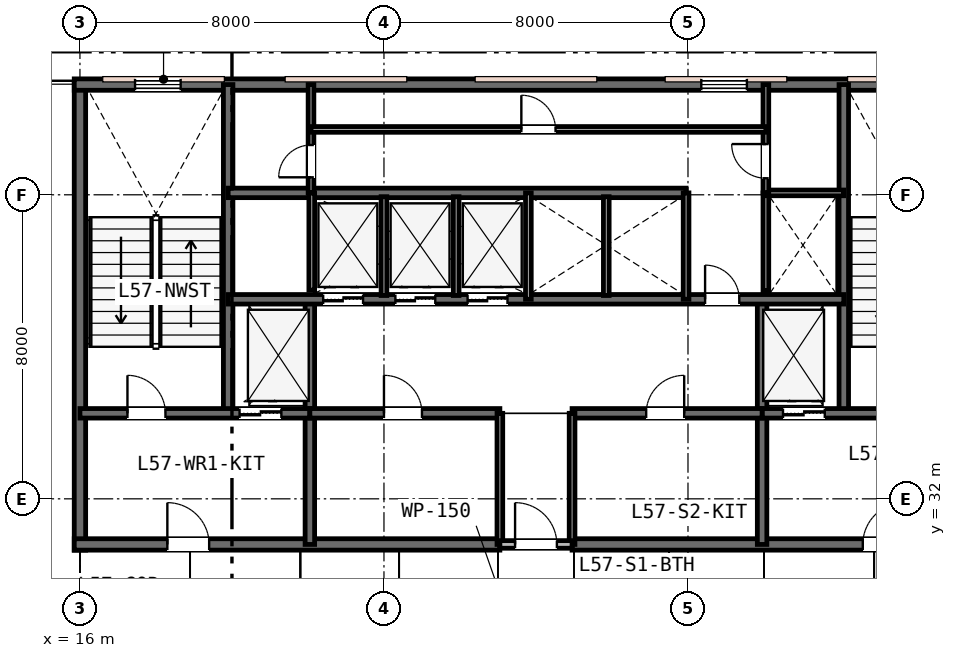
"""IFC4 building model, lengths in metres.
Left out: names, types, materials, properties, quantities, classifications, styles, units other than length and angle.
Written with IfcOpenShell. Run it as: python <this file> out.ifc"""

import sys

from ifc_helpers import new_model, si_unit, direction, frame, frame_2d, origin, place, context, subcontext, project, spatial, rectangle, extrude, element, fill, save


model = new_model("IFC4")
c1 = context("Model", 3, precision=1e-05, world=origin(), true_north=direction((0.0, 1.0)))
c2 = subcontext(c1, "Body", "Model", "MODEL_VIEW")
j1 = project(units=[si_unit("LENGTHUNIT", "METRE"), si_unit("PLANEANGLEUNIT", "RADIAN")], contexts=[c1])
p1 = place(None, origin())
s1 = spatial("IfcSite", under=j1, at=p1, CompositionType="ELEMENT")
p2 = place(p1, origin())
s2 = spatial("IfcBuilding", under=s1, at=p2, CompositionType="ELEMENT")
p3 = place(p2, frame((0.0, 0.0, 222.2)))
s3 = spatial("IfcBuildingStorey", under=s2, at=p3, CompositionType="ELEMENT", Elevation=222.2)
p4 = place(p3, frame((16.0, 30.65, 0.0), z_axis=(0.0, 0.0, 1.0), x_axis=(0.0, 1.0, 0.0)))
e1 = element("IfcWall", 1, at=p4, inside=s3, PredefinedType="SHEAR", context=c2, shape_type="SweptSolid", body=[
    extrude(rectangle(XDim=12.3, YDim=0.3, at=frame_2d((6.15, 0.0))), origin(), (0.0, 0.0, 1.0), 3.8),
])
p5 = place(p3, frame((15.85, 42.9, 0.0), z_axis=(0.0, 0.0, 1.0), x_axis=(1.0, 0.0, 0.0)))
e2 = element("IfcWall", 2, at=p5, inside=s3, PredefinedType="SHEAR", context=c2, shape_type="SweptSolid", body=[
    extrude(rectangle(XDim=24.3, YDim=0.3, at=frame_2d((12.15, 0.0))), origin(), (0.0, 0.0, 1.0), 3.8),
])
p6 = place(p5, frame((1.6, 0.0, 0.95)))
e3 = element("IfcOpeningElement", 3, at=p6, cuts=e2, PredefinedType="OPENING", context=c2, shape_type="SweptSolid", body=[
    extrude(rectangle(XDim=1.2, YDim=1.6, at=frame_2d((0.6, 0.8))), frame((0.0, 0.16, 0.0), z_axis=(0.0, -1.0, 0.0), x_axis=(1.0, 0.0, 0.0)), (0.0, 0.0, 1.0), 0.32),
])
p7 = place(p5, frame((16.5, 0.0, 0.95)))
e4 = element("IfcOpeningElement", 4, at=p7, cuts=e2, PredefinedType="OPENING", context=c2, shape_type="SweptSolid", body=[
    extrude(rectangle(XDim=1.2, YDim=1.6, at=frame_2d((0.6, 0.8))), frame((0.0, 0.16, 0.0), z_axis=(0.0, -1.0, 0.0), x_axis=(1.0, 0.0, 0.0)), (0.0, 0.0, 1.0), 0.32),
])
p8 = place(p5, frame((21.6, 0.0, 0.95)))
e5 = element("IfcOpeningElement", 5, at=p8, cuts=e2, PredefinedType="OPENING", context=c2, shape_type="SweptSolid", body=[
    extrude(rectangle(XDim=1.2, YDim=1.6, at=frame_2d((0.6, 0.8))), frame((0.0, 0.16, 0.0), z_axis=(0.0, -1.0, 0.0), x_axis=(1.0, 0.0, 0.0)), (0.0, 0.0, 1.0), 0.32),
])
p9 = place(p3, frame((15.85, 30.8, 0.0), z_axis=(0.0, 0.0, 1.0), x_axis=(1.0, 0.0, 0.0)))
e6 = element("IfcWall", 6, at=p9, inside=s3, PredefinedType="SHEAR", context=c2, shape_type="SweptSolid", body=[
    extrude(rectangle(XDim=11.2, YDim=0.3, at=frame_2d((5.6, 0.0))), origin(), (0.0, 0.0, 1.0), 3.8),
])
p10 = place(p9, frame((2.45, 0.0, 0.0)))
e7 = element("IfcOpeningElement", 7, at=p10, cuts=e6, PredefinedType="OPENING", context=c2, shape_type="SweptSolid", body=[
    extrude(rectangle(XDim=1.1, YDim=2.15, at=frame_2d((0.55, 1.075))), frame((0.0, 0.16, 0.0), z_axis=(0.0, -1.0, 0.0), x_axis=(1.0, 0.0, 0.0)), (0.0, 0.0, 1.0), 0.32),
])
p11 = place(p3, frame((28.95, 30.8, 0.0), z_axis=(0.0, 0.0, 1.0), x_axis=(1.0, 0.0, 0.0)))
e8 = element("IfcWall", 8, at=p11, inside=s3, PredefinedType="SHEAR", context=c2, shape_type="SweptSolid", body=[
    extrude(rectangle(XDim=11.2, YDim=0.3, at=frame_2d((5.6, 0.0))), origin(), (0.0, 0.0, 1.0), 3.8),
])
p12 = place(p11, frame((7.65, 0.0, 0.0)))
e9 = element("IfcOpeningElement", 9, at=p12, cuts=e8, PredefinedType="OPENING", context=c2, shape_type="SweptSolid", body=[
    extrude(rectangle(XDim=1.1, YDim=2.15, at=frame_2d((0.55, 1.075))), frame((0.0, 0.16, 0.0), z_axis=(0.0, -1.0, 0.0), x_axis=(1.0, 0.0, 0.0)), (0.0, 0.0, 1.0), 0.32),
])
for number, where, z_axis, x_axis in (
    (10, (19.9, 34.25, 0.0), (0.0, 0.0, 1.0), (0.0, 1.0, 0.0)),
    (11, (36.1, 34.25, 0.0), (0.0, 0.0, 1.0), (0.0, 1.0, 0.0)),
):
    element("IfcWall", number, at=place(p3, frame(where, z_axis=z_axis, x_axis=x_axis)), inside=s3, PredefinedType="SHEAR", context=c2, shape_type="SweptSolid", body=[
        extrude(rectangle(XDim=8.65, YDim=0.25, at=frame_2d((4.325, 0.0))), origin(), (0.0, 0.0, 1.0), 3.8),
    ])
for number, where, z_axis, x_axis in (
    (12, (22.05, 30.8, 0.0), (0.0, 0.0, 1.0), (0.0, 1.0, 0.0)),
    (13, (33.95, 30.8, 0.0), (0.0, 0.0, 1.0), (0.0, 1.0, 0.0)),
):
    element("IfcWall", number, at=place(p3, frame(where, z_axis=z_axis, x_axis=x_axis)), inside=s3, PredefinedType="SHEAR", context=c2, shape_type="SweptSolid", body=[
        extrude(rectangle(XDim=6.45, YDim=0.25, at=frame_2d((3.225, 0.0))), origin(), (0.0, 0.0, 1.0), 3.8),
    ])
p13 = place(p3, frame((16.0, 34.25, 0.0), z_axis=(0.0, 0.0, 1.0), x_axis=(1.0, 0.0, 0.0)))
e14 = element("IfcWall", 14, at=p13, inside=s3, PredefinedType="SHEAR", context=c2, shape_type="SweptSolid", body=[
    extrude(rectangle(XDim=6.05, YDim=0.25, at=frame_2d((3.025, 0.0))), origin(), (0.0, 0.0, 1.0), 3.8),
])
p14 = place(p13, frame((1.25, 0.0, 0.0)))
e15 = element("IfcOpeningElement", 15, at=p14, cuts=e14, PredefinedType="OPENING", context=c2, shape_type="SweptSolid", body=[
    extrude(rectangle(XDim=1.0, YDim=2.15, at=frame_2d((0.5, 1.075))), frame((0.0, 0.135, 0.0), z_axis=(0.0, -1.0, 0.0), x_axis=(1.0, 0.0, 0.0)), (0.0, 0.0, 1.0), 0.27),
])
p15 = place(p13, frame((4.2, 0.0, 0.0)))
e16 = element("IfcOpeningElement", 16, at=p15, cuts=e14, PredefinedType="OPENING", context=c2, shape_type="SweptSolid", body=[
    extrude(rectangle(XDim=1.1, YDim=2.15, at=frame_2d((0.55, 1.075))), frame((0.0, 0.135, 0.0), z_axis=(0.0, -1.0, 0.0), x_axis=(1.0, 0.0, 0.0)), (0.0, 0.0, 1.0), 0.27),
])
p16 = place(p3, frame((33.95, 34.25, 0.0), z_axis=(0.0, 0.0, 1.0), x_axis=(1.0, 0.0, 0.0)))
e17 = element("IfcWall", 17, at=p16, inside=s3, PredefinedType="SHEAR", context=c2, shape_type="SweptSolid", body=[
    extrude(rectangle(XDim=6.05, YDim=0.25, at=frame_2d((3.025, 0.0))), origin(), (0.0, 0.0, 1.0), 3.8),
])
p17 = place(p16, frame((3.7, 0.0, 0.0)))
e18 = element("IfcOpeningElement", 18, at=p17, cuts=e17, PredefinedType="OPENING", context=c2, shape_type="SweptSolid", body=[
    extrude(rectangle(XDim=1.0, YDim=2.15, at=frame_2d((0.5, 1.075))), frame((0.0, 0.135, 0.0), z_axis=(0.0, -1.0, 0.0), x_axis=(1.0, 0.0, 0.0)), (0.0, 0.0, 1.0), 0.27),
])
p18 = place(p16, frame((0.55, 0.0, 0.0)))
e19 = element("IfcOpeningElement", 19, at=p18, cuts=e17, PredefinedType="OPENING", context=c2, shape_type="SweptSolid", body=[
    extrude(rectangle(XDim=1.1, YDim=2.15, at=frame_2d((0.55, 1.075))), frame((0.0, 0.135, 0.0), z_axis=(0.0, -1.0, 0.0), x_axis=(1.0, 0.0, 0.0)), (0.0, 0.0, 1.0), 0.27),
])
p19 = place(p3, frame((22.05, 34.25, 0.0), z_axis=(0.0, 0.0, 1.0), x_axis=(1.0, 0.0, 0.0)))
e20 = element("IfcWall", 20, at=p19, inside=s3, PredefinedType="SHEAR", context=c2, shape_type="SweptSolid", body=[
    extrude(rectangle(XDim=5.0, YDim=0.25, at=frame_2d((2.5, 0.0))), origin(), (0.0, 0.0, 1.0), 3.8),
])
p20 = place(p19, frame((1.95, 0.0, 0.0)))
e21 = element("IfcOpeningElement", 21, at=p20, cuts=e20, PredefinedType="OPENING", context=c2, shape_type="SweptSolid", body=[
    extrude(rectangle(XDim=1.0, YDim=2.15, at=frame_2d((0.5, 1.075))), frame((0.0, 0.135, 0.0), z_axis=(0.0, -1.0, 0.0), x_axis=(1.0, 0.0, 0.0)), (0.0, 0.0, 1.0), 0.27),
])
p21 = place(p3, frame((28.95, 34.25, 0.0), z_axis=(0.0, 0.0, 1.0), x_axis=(1.0, 0.0, 0.0)))
e22 = element("IfcWall", 22, at=p21, inside=s3, PredefinedType="SHEAR", context=c2, shape_type="SweptSolid", body=[
    extrude(rectangle(XDim=5.0, YDim=0.25, at=frame_2d((2.5, 0.0))), origin(), (0.0, 0.0, 1.0), 3.8),
])
p22 = place(p21, frame((1.95, 0.0, 0.0)))
e23 = element("IfcOpeningElement", 23, at=p22, cuts=e22, PredefinedType="OPENING", context=c2, shape_type="SweptSolid", body=[
    extrude(rectangle(XDim=1.0, YDim=2.15, at=frame_2d((0.5, 1.075))), frame((0.0, 0.135, 0.0), z_axis=(0.0, -1.0, 0.0), x_axis=(1.0, 0.0, 0.0)), (0.0, 0.0, 1.0), 0.27),
])
p23 = place(p3, frame((19.9, 37.25, 0.0), z_axis=(0.0, 0.0, 1.0), x_axis=(1.0, 0.0, 0.0)))
e24 = element("IfcWall", 24, at=p23, inside=s3, PredefinedType="SHEAR", context=c2, shape_type="SweptSolid", body=[
    extrude(rectangle(XDim=16.2, YDim=0.25, at=frame_2d((8.1, 0.0))), origin(), (0.0, 0.0, 1.0), 3.8),
])
p24 = place(p23, frame((12.55, 0.0, 0.0)))
e25 = element("IfcOpeningElement", 25, at=p24, cuts=e24, PredefinedType="OPENING", context=c2, shape_type="SweptSolid", body=[
    extrude(rectangle(XDim=0.9, YDim=2.15, at=frame_2d((0.45, 1.075))), frame((0.0, 0.135, 0.0), z_axis=(0.0, -1.0, 0.0), x_axis=(1.0, 0.0, 0.0)), (0.0, 0.0, 1.0), 0.27),
])
p25 = place(p23, frame((2.5, 0.0, 0.0)))
e26 = element("IfcOpeningElement", 26, at=p25, cuts=e24, PredefinedType="OPENING", context=c2, shape_type="SweptSolid", body=[
    extrude(rectangle(XDim=1.05, YDim=2.15, at=frame_2d((0.525, 1.075))), frame((0.0, 0.135, 0.0), z_axis=(0.0, -1.0, 0.0), x_axis=(1.0, 0.0, 0.0)), (0.0, 0.0, 1.0), 0.27),
])
p26 = place(p23, frame((4.4, 0.0, 0.0)))
e27 = element("IfcOpeningElement", 27, at=p26, cuts=e24, PredefinedType="OPENING", context=c2, shape_type="SweptSolid", body=[
    extrude(rectangle(XDim=1.05, YDim=2.15, at=frame_2d((0.525, 1.075))), frame((0.0, 0.135, 0.0), z_axis=(0.0, -1.0, 0.0), x_axis=(1.0, 0.0, 0.0)), (0.0, 0.0, 1.0), 0.27),
])
p27 = place(p23, frame((6.3, 0.0, 0.0)))
e28 = element("IfcOpeningElement", 28, at=p27, cuts=e24, PredefinedType="OPENING", context=c2, shape_type="SweptSolid", body=[
    extrude(rectangle(XDim=1.05, YDim=2.15, at=frame_2d((0.525, 1.075))), frame((0.0, 0.135, 0.0), z_axis=(0.0, -1.0, 0.0), x_axis=(1.0, 0.0, 0.0)), (0.0, 0.0, 1.0), 0.27),
])
p28 = place(p3, frame((19.9, 40.05, 0.0), z_axis=(0.0, 0.0, 1.0), x_axis=(1.0, 0.0, 0.0)))
e29 = element("IfcWall", 29, at=p28, inside=s3, PredefinedType="SHEAR", context=c2, shape_type="SweptSolid", body=[
    extrude(rectangle(XDim=12.05, YDim=0.25, at=frame_2d((6.025, 0.0))), origin(), (0.0, 0.0, 1.0), 3.8),
])
for number, where, z_axis, x_axis in (
    (30, (27.05, 30.8, 0.0), (0.0, 0.0, 1.0), (0.0, 1.0, 0.0)),
    (31, (28.95, 30.8, 0.0), (0.0, 0.0, 1.0), (0.0, 1.0, 0.0)),
):
    element("IfcWall", number, at=place(p3, frame(where, z_axis=z_axis, x_axis=x_axis)), inside=s3, PredefinedType="PLUMBINGWALL", context=c2, shape_type="SweptSolid", body=[
        extrude(rectangle(XDim=3.45, YDim=0.15, at=frame_2d((1.725, 0.0))), origin(), (0.0, 0.0, 1.0), 3.22),
    ])
p29 = place(p3, frame((27.05, 30.8, 0.0), z_axis=(0.0, 0.0, 1.0), x_axis=(1.0, 0.0, 0.0)))
e32 = element("IfcWall", 32, at=p29, inside=s3, PredefinedType="PARTITIONING", context=c2, shape_type="SweptSolid", body=[
    extrude(rectangle(XDim=1.9, YDim=0.2, at=frame_2d((0.95, 0.0))), origin(), (0.0, 0.0, 1.0), 3.22),
])
p30 = place(p29, frame((0.4, 0.0, 0.0)))
e33 = element("IfcOpeningElement", 33, at=p30, cuts=e32, PredefinedType="OPENING", context=c2, shape_type="SweptSolid", body=[
    extrude(rectangle(XDim=1.1, YDim=2.15, at=frame_2d((0.55, 1.075))), frame((0.0, 0.11, 0.0), z_axis=(0.0, -1.0, 0.0), x_axis=(1.0, 0.0, 0.0)), (0.0, 0.0, 1.0), 0.22),
])
p31 = place(p3, frame((22.1, 37.49, 0.0), z_axis=(0.0, 0.0, 1.0), x_axis=(0.0, 1.0, 0.0)))
e34 = element("IfcWall", 34, at=p31, inside=s3, PredefinedType="PLUMBINGWALL", context=c2, shape_type="SweptSolid", body=[
    extrude(rectangle(XDim=2.56, YDim=0.15, at=frame_2d((1.28, 0.0))), origin(), (0.0, 0.0, 1.0), 3.53),
])
p32 = place(p3, frame((27.8, 37.25, 0.0), z_axis=(0.0, 0.0, 1.0), x_axis=(0.0, 1.0, 0.0)))
e35 = element("IfcWall", 35, at=p32, inside=s3, PredefinedType="PLUMBINGWALL", context=c2, shape_type="SweptSolid", body=[
    extrude(rectangle(XDim=2.8, YDim=0.15, at=frame_2d((1.4, 0.0))), origin(), (0.0, 0.0, 1.0), 3.53),
])
for number, where, z_axis, x_axis in (
    (36, (24.0, 37.35, 0.0), (0.0, 0.0, 1.0), (0.0, 1.0, 0.0)),
    (37, (25.9, 37.35, 0.0), (0.0, 0.0, 1.0), (0.0, 1.0, 0.0)),
):
    element("IfcWall", number, at=place(p3, frame(where, z_axis=z_axis, x_axis=x_axis)), inside=s3, PredefinedType="PLUMBINGWALL", context=c2, shape_type="SweptSolid", body=[
        extrude(rectangle(XDim=2.6, YDim=0.15, at=frame_2d((1.3, 0.0))), origin(), (0.0, 0.0, 1.0), 3.53),
    ])
p33 = place(p3, frame((31.95, 37.25, 0.0), z_axis=(0.0, 0.0, 1.0), x_axis=(0.0, 1.0, 0.0)))
e38 = element("IfcWall", 38, at=p33, inside=s3, PredefinedType="PLUMBINGWALL", context=c2, shape_type="SweptSolid", body=[
    extrude(rectangle(XDim=2.8, YDim=0.15, at=frame_2d((1.4, 0.0))), origin(), (0.0, 0.0, 1.0), 3.53),
])
p34 = place(p3, frame((29.85, 37.35, 0.0), z_axis=(0.0, 0.0, 1.0), x_axis=(0.0, 1.0, 0.0)))
e39 = element("IfcWall", 39, at=p34, inside=s3, PredefinedType="PLUMBINGWALL", context=c2, shape_type="SweptSolid", body=[
    extrude(rectangle(XDim=2.6, YDim=0.15, at=frame_2d((1.3, 0.0))), origin(), (0.0, 0.0, 1.0), 3.53),
])
p35 = place(p3, frame((34.05, 37.473, 0.0), z_axis=(0.0, 0.0, 1.0), x_axis=(0.0, 1.0, 0.0)))
e40 = element("IfcWall", 40, at=p35, inside=s3, PredefinedType="PLUMBINGWALL", context=c2, shape_type="SweptSolid", body=[
    extrude(rectangle(XDim=2.577, YDim=0.15, at=frame_2d((1.288, 0.0))), origin(), (0.0, 0.0, 1.0), 3.53),
])
p36 = place(p3, frame((34.05, 40.05, 0.0), z_axis=(0.0, 0.0, 1.0), x_axis=(1.0, 0.0, 0.0)))
e41 = element("IfcWall", 41, at=p36, inside=s3, PredefinedType="PARTITIONING", context=c2, shape_type="SweptSolid", body=[
    extrude(rectangle(XDim=2.05, YDim=0.15, at=frame_2d((1.025, 0.0))), origin(), (0.0, 0.0, 1.0), 3.53),
])
p37 = place(p3, frame((34.05, 40.05, 0.0), z_axis=(0.0, 0.0, 1.0), x_axis=(0.0, 1.0, 0.0)))
e42 = element("IfcWall", 42, at=p37, inside=s3, PredefinedType="PARTITIONING", context=c2, shape_type="SweptSolid", body=[
    extrude(rectangle(XDim=2.85, YDim=0.15, at=frame_2d((1.425, 0.0))), origin(), (0.0, 0.0, 1.0), 3.53),
])
p38 = place(p37, frame((0.385, 0.0, 0.0)))
e43 = element("IfcOpeningElement", 43, at=p38, cuts=e42, PredefinedType="OPENING", context=c2, shape_type="SweptSolid", body=[
    extrude(rectangle(XDim=0.9, YDim=2.15, at=frame_2d((0.45, 1.075))), frame((0.0, 0.085, 0.0), z_axis=(0.0, -1.0, 0.0), x_axis=(1.0, 0.0, 0.0)), (0.0, 0.0, 1.0), 0.17),
])
p39 = place(p3, frame((22.08, 40.05, 0.0), z_axis=(0.0, 0.0, 1.0), x_axis=(0.0, 1.0, 0.0)))
e44 = element("IfcWall", 44, at=p39, inside=s3, PredefinedType="PARTITIONING", context=c2, shape_type="SweptSolid", body=[
    extrude(rectangle(XDim=2.85, YDim=0.15, at=frame_2d((1.425, 0.0))), origin(), (0.0, 0.0, 1.0), 3.53),
])
p40 = place(p39, frame((0.41, 0.0, 0.0)))
e45 = element("IfcOpeningElement", 45, at=p40, cuts=e44, PredefinedType="OPENING", context=c2, shape_type="SweptSolid", body=[
    extrude(rectangle(XDim=0.85, YDim=2.15, at=frame_2d((0.425, 1.075))), frame((0.0, 0.085, 0.0), z_axis=(0.0, -1.0, 0.0), x_axis=(1.0, 0.0, 0.0)), (0.0, 0.0, 1.0), 0.17),
])
p41 = place(p3, frame((22.08, 41.72, 0.0), z_axis=(0.0, 0.0, 1.0), x_axis=(1.0, 0.0, 0.0)))
e46 = element("IfcWall", 46, at=p41, inside=s3, PredefinedType="PARTITIONING", context=c2, shape_type="SweptSolid", body=[
    extrude(rectangle(XDim=11.97, YDim=0.15, at=frame_2d((5.985, 0.0))), origin(), (0.0, 0.0, 1.0), 3.53),
])
p42 = place(p41, frame((5.535, 0.0, 0.0)))
e47 = element("IfcOpeningElement", 47, at=p42, cuts=e46, PredefinedType="OPENING", context=c2, shape_type="SweptSolid", body=[
    extrude(rectangle(XDim=0.9, YDim=2.15, at=frame_2d((0.45, 1.075))), frame((0.0, 0.085, 0.0), z_axis=(0.0, -1.0, 0.0), x_axis=(1.0, 0.0, 0.0)), (0.0, 0.0, 1.0), 0.17),
])
p43 = place(p6, origin())
e48 = element("IfcWindow", 48, at=p43, inside=s3, PartitioningType="SINGLE_PANEL", PredefinedType="WINDOW", context=c2, shape_type="SweptSolid", body=[
    extrude(rectangle(XDim=1.2, YDim=1.6, at=frame_2d((0.6, 0.8))), frame((0.0, 0.03, 0.0), z_axis=(0.0, -1.0, 0.0), x_axis=(1.0, 0.0, 0.0)), (0.0, 0.0, 1.0), 0.06),
])
fill(e3, e48)
p44 = place(p7, origin())
e49 = element("IfcWindow", 49, at=p44, inside=s3, PartitioningType="SINGLE_PANEL", PredefinedType="WINDOW", context=c2, shape_type="SweptSolid", body=[
    extrude(rectangle(XDim=1.2, YDim=1.6, at=frame_2d((0.6, 0.8))), frame((0.0, 0.03, 0.0), z_axis=(0.0, -1.0, 0.0), x_axis=(1.0, 0.0, 0.0)), (0.0, 0.0, 1.0), 0.06),
])
fill(e4, e49)
p45 = place(p30, origin())
e50 = element("IfcDoor", 50, at=p45, inside=s3, OperationType="SINGLE_SWING_LEFT", PredefinedType="DOOR", context=c2, shape_type="SweptSolid", body=[
    extrude(rectangle(XDim=1.1, YDim=2.15, at=frame_2d((0.55, 1.075))), frame((0.0, 0.025, 0.0), z_axis=(0.0, -1.0, 0.0), x_axis=(1.0, 0.0, 0.0)), (0.0, 0.0, 1.0), 0.05),
])
fill(e33, e50)
p46 = place(p14, origin())
e51 = element("IfcDoor", 51, at=p46, inside=s3, OperationType="SINGLE_SWING_LEFT", PredefinedType="DOOR", context=c2, shape_type="SweptSolid", body=[
    extrude(rectangle(XDim=1.0, YDim=2.15, at=frame_2d((0.5, 1.075))), frame((0.0, 0.025, 0.0), z_axis=(0.0, -1.0, 0.0), x_axis=(1.0, 0.0, 0.0)), (0.0, 0.0, 1.0), 0.05),
])
fill(e15, e51)
p47 = place(p10, origin())
e52 = element("IfcDoor", 52, at=p47, inside=s3, OperationType="SINGLE_SWING_LEFT", PredefinedType="DOOR", context=c2, shape_type="SweptSolid", body=[
    extrude(rectangle(XDim=1.1, YDim=2.15, at=frame_2d((0.55, 1.075))), frame((0.0, 0.025, 0.0), z_axis=(0.0, -1.0, 0.0), x_axis=(1.0, 0.0, 0.0)), (0.0, 0.0, 1.0), 0.05),
])
fill(e7, e52)
p48 = place(p12, origin())
e53 = element("IfcDoor", 53, at=p48, inside=s3, OperationType="SINGLE_SWING_RIGHT", PredefinedType="DOOR", context=c2, shape_type="SweptSolid", body=[
    extrude(rectangle(XDim=1.1, YDim=2.15, at=frame_2d((0.55, 1.075))), frame((0.0, 0.025, 0.0), z_axis=(0.0, -1.0, 0.0), x_axis=(1.0, 0.0, 0.0)), (0.0, 0.0, 1.0), 0.05),
])
fill(e9, e53)
p49 = place(p20, origin())
e54 = element("IfcDoor", 54, at=p49, inside=s3, OperationType="SINGLE_SWING_LEFT", PredefinedType="DOOR", context=c2, shape_type="SweptSolid", body=[
    extrude(rectangle(XDim=1.0, YDim=2.15, at=frame_2d((0.5, 1.075))), frame((0.0, 0.025, 0.0), z_axis=(0.0, -1.0, 0.0), x_axis=(1.0, 0.0, 0.0)), (0.0, 0.0, 1.0), 0.05),
])
fill(e21, e54)
p50 = place(p22, origin())
e55 = element("IfcDoor", 55, at=p50, inside=s3, OperationType="SINGLE_SWING_RIGHT", PredefinedType="DOOR", context=c2, shape_type="SweptSolid", body=[
    extrude(rectangle(XDim=1.0, YDim=2.15, at=frame_2d((0.5, 1.075))), frame((0.0, 0.025, 0.0), z_axis=(0.0, -1.0, 0.0), x_axis=(1.0, 0.0, 0.0)), (0.0, 0.0, 1.0), 0.05),
])
fill(e23, e55)
p51 = place(p24, origin())
e56 = element("IfcDoor", 56, at=p51, inside=s3, OperationType="SINGLE_SWING_LEFT", PredefinedType="DOOR", context=c2, shape_type="SweptSolid", body=[
    extrude(rectangle(XDim=0.9, YDim=2.15, at=frame_2d((0.45, 1.075))), frame((0.0, 0.025, 0.0), z_axis=(0.0, -1.0, 0.0), x_axis=(1.0, 0.0, 0.0)), (0.0, 0.0, 1.0), 0.05),
])
fill(e25, e56)
p52 = place(p38, origin())
e57 = element("IfcDoor", 57, at=p52, inside=s3, OperationType="SINGLE_SWING_RIGHT", PredefinedType="DOOR", context=c2, shape_type="SweptSolid", body=[
    extrude(rectangle(XDim=0.9, YDim=2.15, at=frame_2d((0.45, 1.075))), frame((0.0, 0.025, 0.0), z_axis=(0.0, -1.0, 0.0), x_axis=(1.0, 0.0, 0.0)), (0.0, 0.0, 1.0), 0.05),
])
fill(e43, e57)
p53 = place(p40, origin())
e58 = element("IfcDoor", 58, at=p53, inside=s3, OperationType="SINGLE_SWING_LEFT", PredefinedType="DOOR", context=c2, shape_type="SweptSolid", body=[
    extrude(rectangle(XDim=0.85, YDim=2.15, at=frame_2d((0.425, 1.075))), frame((0.0, 0.025, 0.0), z_axis=(0.0, -1.0, 0.0), x_axis=(1.0, 0.0, 0.0)), (0.0, 0.0, 1.0), 0.05),
])
fill(e45, e58)
p54 = place(p42, origin())
e59 = element("IfcDoor", 59, at=p54, inside=s3, OperationType="SINGLE_SWING_LEFT", PredefinedType="DOOR", context=c2, shape_type="SweptSolid", body=[
    extrude(rectangle(XDim=0.9, YDim=2.15, at=frame_2d((0.45, 1.075))), frame((0.0, 0.025, 0.0), z_axis=(0.0, -1.0, 0.0), x_axis=(1.0, 0.0, 0.0)), (0.0, 0.0, 1.0), 0.05),
])
fill(e47, e59)
p55 = place(p15, origin())
e60 = element("IfcDoor", 60, at=p55, inside=s3, OperationType="DOUBLE_DOOR_SLIDING", PredefinedType="DOOR", context=c2, shape_type="SweptSolid", body=[
    extrude(rectangle(XDim=1.1, YDim=2.15, at=frame_2d((0.55, 1.075))), frame((0.0, 0.025, 0.0), z_axis=(0.0, -1.0, 0.0), x_axis=(1.0, 0.0, 0.0)), (0.0, 0.0, 1.0), 0.05),
])
fill(e16, e60)
p56 = place(p18, origin())
e61 = element("IfcDoor", 61, at=p56, inside=s3, OperationType="DOUBLE_DOOR_SLIDING", PredefinedType="DOOR", context=c2, shape_type="SweptSolid", body=[
    extrude(rectangle(XDim=1.1, YDim=2.15, at=frame_2d((0.55, 1.075))), frame((0.0, 0.025, 0.0), z_axis=(0.0, -1.0, 0.0), x_axis=(1.0, 0.0, 0.0)), (0.0, 0.0, 1.0), 0.05),
])
fill(e19, e61)
p57 = place(p25, origin())
e62 = element("IfcDoor", 62, at=p57, inside=s3, OperationType="DOUBLE_DOOR_SLIDING", PredefinedType="DOOR", context=c2, shape_type="SweptSolid", body=[
    extrude(rectangle(XDim=1.05, YDim=2.15, at=frame_2d((0.525, 1.075))), frame((0.0, 0.025, 0.0), z_axis=(0.0, -1.0, 0.0), x_axis=(1.0, 0.0, 0.0)), (0.0, 0.0, 1.0), 0.05),
])
fill(e26, e62)
p58 = place(p26, origin())
e63 = element("IfcDoor", 63, at=p58, inside=s3, OperationType="DOUBLE_DOOR_SLIDING", PredefinedType="DOOR", context=c2, shape_type="SweptSolid", body=[
    extrude(rectangle(XDim=1.05, YDim=2.15, at=frame_2d((0.525, 1.075))), frame((0.0, 0.025, 0.0), z_axis=(0.0, -1.0, 0.0), x_axis=(1.0, 0.0, 0.0)), (0.0, 0.0, 1.0), 0.05),
])
fill(e27, e63)
p59 = place(p27, origin())
e64 = element("IfcDoor", 64, at=p59, inside=s3, OperationType="DOUBLE_DOOR_SLIDING", PredefinedType="DOOR", context=c2, shape_type="SweptSolid", body=[
    extrude(rectangle(XDim=1.05, YDim=2.15, at=frame_2d((0.525, 1.075))), frame((0.0, 0.025, 0.0), z_axis=(0.0, -1.0, 0.0), x_axis=(1.0, 0.0, 0.0)), (0.0, 0.0, 1.0), 0.05),
])
fill(e28, e64)
save(model, sys.argv[1])
